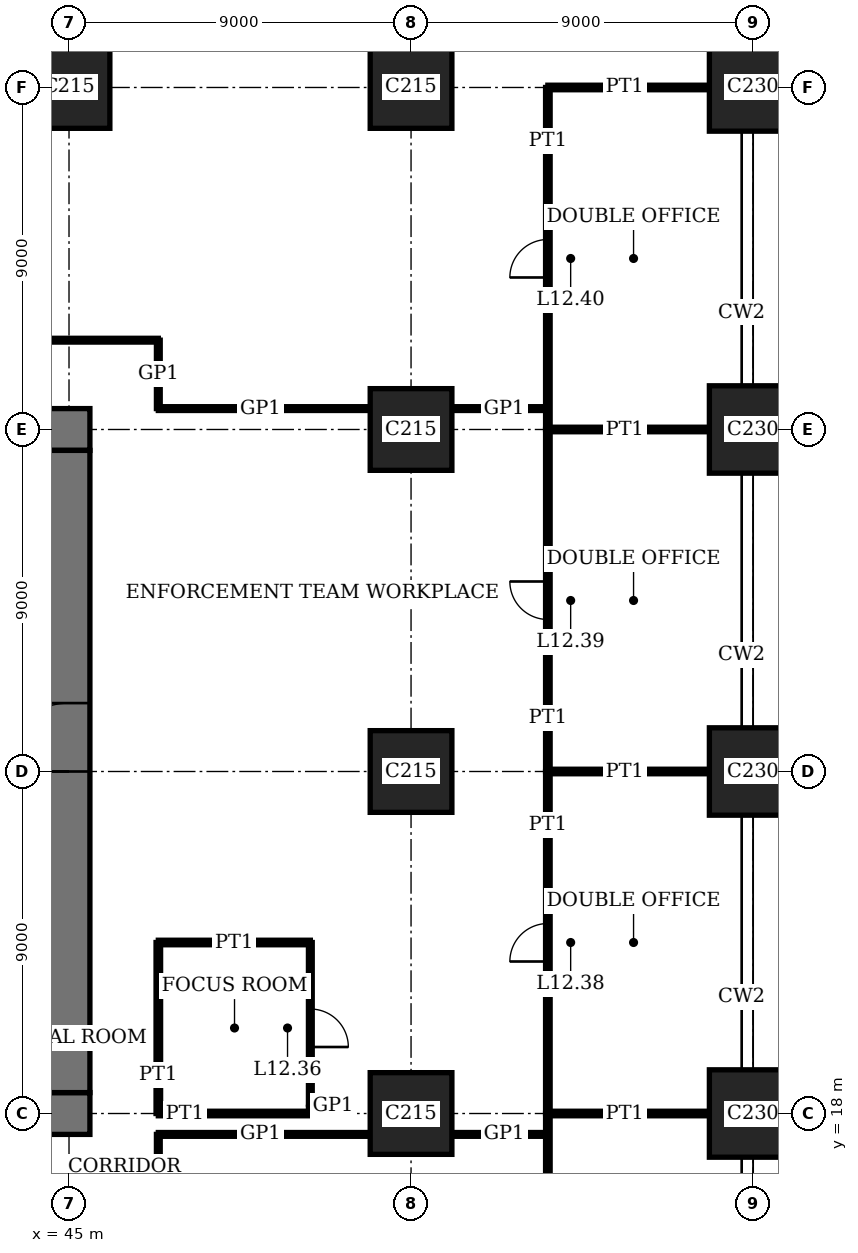
"""IFC4 building model, lengths in metres.
Left out: names, types, materials, properties, quantities, classifications, styles, units other than length and angle.
Written with IfcOpenShell. Run it as: python <this file> out.ifc"""

import sys

from ifc_helpers import new_model, si_unit, direction, frame, frame_2d, origin, origin_2d, place, context, subcontext, project, spatial, rectangle, extrude, element, fill, save


model = new_model("IFC4")
c1 = context("Model", 3, precision=1e-05, world=origin(), true_north=direction((0.0, 1.0)))
c2 = subcontext(c1, "Body", "Model", "MODEL_VIEW")
j1 = project(units=[si_unit("LENGTHUNIT", "METRE"), si_unit("PLANEANGLEUNIT", "RADIAN")], contexts=[c1])
p1 = place(None, origin())
s1 = spatial("IfcSite", under=j1, at=p1, CompositionType="ELEMENT")
p2 = place(p1, origin())
s2 = spatial("IfcBuilding", under=s1, at=p2, CompositionType="ELEMENT")
p3 = place(p2, frame((0.0, 0.0, 51.8)))
s3 = spatial("IfcBuildingStorey", under=s2, at=p3, CompositionType="ELEMENT", Elevation=51.8)
for number, where, z_axis, x_axis in (
    (1, (45.0, 45.0, 0.0), (0.0, 0.0, 1.0), (1.0, 0.0, 0.0)),
    (2, (54.0, 18.0, 0.0), (0.0, 0.0, 1.0), (1.0, 0.0, 0.0)),
    (3, (54.0, 27.0, 0.0), (0.0, 0.0, 1.0), (1.0, 0.0, 0.0)),
    (4, (54.0, 36.0, 0.0), (0.0, 0.0, 1.0), (1.0, 0.0, 0.0)),
    (5, (54.0, 45.0, 0.0), (0.0, 0.0, 1.0), (1.0, 0.0, 0.0)),
):
    element("IfcColumn", number, at=place(p3, frame(where, z_axis=z_axis, x_axis=x_axis)), inside=s3, PredefinedType="COLUMN", context=c2, shape_type="SweptSolid", body=[
        extrude(rectangle(XDim=2.15, YDim=2.15, at=origin_2d()), origin(), (0.0, 0.0, 1.0), 4.0),
    ])
for number, where, z_axis, x_axis in (
    (6, (63.0, 18.0, 0.0), (0.0, 0.0, 1.0), (1.0, 0.0, 0.0)),
    (7, (63.0, 27.0, 0.0), (0.0, 0.0, 1.0), (1.0, 0.0, 0.0)),
    (8, (63.0, 36.0, 0.0), (0.0, 0.0, 1.0), (1.0, 0.0, 0.0)),
    (9, (63.0, 45.0, 0.0), (0.0, 0.0, 1.0), (1.0, 0.0, 0.0)),
):
    element("IfcColumn", number, at=place(p3, frame(where, z_axis=z_axis, x_axis=x_axis)), inside=s3, PredefinedType="COLUMN", context=c2, shape_type="SweptSolid", body=[
        extrude(rectangle(XDim=2.3, YDim=2.3, at=origin_2d()), origin(), (0.0, 0.0, 1.0), 4.0),
    ])
p4 = place(p3, frame((17.45, 18.0, 0.0), z_axis=(0.0, 0.0, 1.0), x_axis=(1.0, 0.0, 0.0)))
e10 = element("IfcWall", 10, at=p4, inside=s3, PredefinedType="SHEAR", context=c2, shape_type="SweptSolid", body=[
    extrude(rectangle(XDim=28.1, YDim=1.1, at=frame_2d((14.05, 0.0))), origin(), (0.0, 0.0, 1.0), 4.0),
])
p5 = place(p4, frame((11.55, 0.0, 0.0)))
e11 = element("IfcOpeningElement", 11, at=p5, cuts=e10, PredefinedType="OPENING", context=c2, shape_type="SweptSolid", body=[
    extrude(rectangle(XDim=1.0, YDim=2.4, at=frame_2d((0.5, 1.2))), frame((0.0, 0.56, 0.0), z_axis=(0.0, -1.0, 0.0), x_axis=(1.0, 0.0, 0.0)), (0.0, 0.0, 1.0), 1.12),
])
p6 = place(p4, frame((16.55, 0.0, 0.0)))
e12 = element("IfcOpeningElement", 12, at=p6, cuts=e10, PredefinedType="OPENING", context=c2, shape_type="SweptSolid", body=[
    extrude(rectangle(XDim=1.0, YDim=2.4, at=frame_2d((0.5, 1.2))), frame((0.0, 0.56, 0.0), z_axis=(0.0, -1.0, 0.0), x_axis=(1.0, 0.0, 0.0)), (0.0, 0.0, 1.0), 1.12),
])
p7 = place(p4, frame((20.0, 0.0, 0.0)))
e13 = element("IfcOpeningElement", 13, at=p7, cuts=e10, PredefinedType="OPENING", context=c2, shape_type="SweptSolid", body=[
    extrude(rectangle(XDim=1.1, YDim=2.4, at=frame_2d((0.55, 1.2))), frame((0.0, 0.56, 0.0), z_axis=(0.0, -1.0, 0.0), x_axis=(1.0, 0.0, 0.0)), (0.0, 0.0, 1.0), 1.12),
])
p8 = place(p4, frame((24.05, 0.0, 0.0)))
e14 = element("IfcOpeningElement", 14, at=p8, cuts=e10, PredefinedType="OPENING", context=c2, shape_type="SweptSolid", body=[
    extrude(rectangle(XDim=1.0, YDim=2.4, at=frame_2d((0.5, 1.2))), frame((0.0, 0.56, 0.0), z_axis=(0.0, -1.0, 0.0), x_axis=(1.0, 0.0, 0.0)), (0.0, 0.0, 1.0), 1.12),
])
p9 = place(p3, frame((45.55, 36.0, 0.0), z_axis=(0.0, 0.0, 1.0), x_axis=(-1.0, 0.0, 0.0)))
e15 = element("IfcWall", 15, at=p9, inside=s3, PredefinedType="SHEAR", context=c2, shape_type="SweptSolid", body=[
    extrude(rectangle(XDim=28.1, YDim=1.1, at=frame_2d((14.05, 0.0))), origin(), (0.0, 0.0, 1.0), 4.0),
])
p10 = place(p9, frame((11.55, 0.0, 0.0)))
e16 = element("IfcOpeningElement", 16, at=p10, cuts=e15, PredefinedType="OPENING", context=c2, shape_type="SweptSolid", body=[
    extrude(rectangle(XDim=1.0, YDim=2.4, at=frame_2d((0.5, 1.2))), frame((0.0, 0.56, 0.0), z_axis=(0.0, -1.0, 0.0), x_axis=(1.0, 0.0, 0.0)), (0.0, 0.0, 1.0), 1.12),
])
p11 = place(p9, frame((16.55, 0.0, 0.0)))
e17 = element("IfcOpeningElement", 17, at=p11, cuts=e15, PredefinedType="OPENING", context=c2, shape_type="SweptSolid", body=[
    extrude(rectangle(XDim=1.0, YDim=2.4, at=frame_2d((0.5, 1.2))), frame((0.0, 0.56, 0.0), z_axis=(0.0, -1.0, 0.0), x_axis=(1.0, 0.0, 0.0)), (0.0, 0.0, 1.0), 1.12),
])
p12 = place(p9, frame((20.0, 0.0, 0.0)))
e18 = element("IfcOpeningElement", 18, at=p12, cuts=e15, PredefinedType="OPENING", context=c2, shape_type="SweptSolid", body=[
    extrude(rectangle(XDim=1.1, YDim=2.4, at=frame_2d((0.55, 1.2))), frame((0.0, 0.56, 0.0), z_axis=(0.0, -1.0, 0.0), x_axis=(1.0, 0.0, 0.0)), (0.0, 0.0, 1.0), 1.12),
])
p13 = place(p9, frame((24.05, 0.0, 0.0)))
e19 = element("IfcOpeningElement", 19, at=p13, cuts=e15, PredefinedType="OPENING", context=c2, shape_type="SweptSolid", body=[
    extrude(rectangle(XDim=1.0, YDim=2.4, at=frame_2d((0.5, 1.2))), frame((0.0, 0.56, 0.0), z_axis=(0.0, -1.0, 0.0), x_axis=(1.0, 0.0, 0.0)), (0.0, 0.0, 1.0), 1.12),
])
p14 = place(p3, frame((45.0, 18.55, 0.0), z_axis=(0.0, 0.0, 1.0), x_axis=(0.0, 1.0, 0.0)))
e20 = element("IfcWall", 20, at=p14, inside=s3, PredefinedType="SHEAR", context=c2, shape_type="SweptSolid", body=[
    extrude(rectangle(XDim=16.9, YDim=1.1, at=frame_2d((8.45, 0.0))), origin(), (0.0, 0.0, 1.0), 4.0),
])
p15 = place(p14, frame((8.45, 0.0, 0.0)))
e21 = element("IfcOpeningElement", 21, at=p15, cuts=e20, PredefinedType="OPENING", context=c2, shape_type="SweptSolid", body=[
    extrude(rectangle(XDim=1.8, YDim=2.4, at=frame_2d((0.9, 1.2))), frame((0.0, 0.56, 0.0), z_axis=(0.0, -1.0, 0.0), x_axis=(1.0, 0.0, 0.0)), (0.0, 0.0, 1.0), 1.12),
])
p16 = place(p3, frame((47.35, 17.45, 0.0), z_axis=(0.0, 0.0, 1.0), x_axis=(1.0, 0.0, 0.0)))
e22 = element("IfcWall", 22, at=p16, inside=s3, PredefinedType="PARTITIONING", context=c2, shape_type="SweptSolid", body=[
    extrude(rectangle(XDim=5.575, YDim=0.1, at=frame_2d((2.788, 0.0))), origin(), (0.0, 0.0, 1.0), 3.75),
])
p17 = place(p3, frame((55.075, 17.45, 0.0), z_axis=(0.0, 0.0, 1.0), x_axis=(1.0, 0.0, 0.0)))
e23 = element("IfcWall", 23, at=p17, inside=s3, PredefinedType="PARTITIONING", context=c2, shape_type="SweptSolid", body=[
    extrude(rectangle(XDim=2.535, YDim=0.1, at=frame_2d((1.268, 0.0))), origin(), (0.0, 0.0, 1.0), 3.75),
])
p18 = place(p3, frame((57.6, 18.0, 0.0), z_axis=(0.0, 0.0, 1.0), x_axis=(1.0, 0.0, 0.0)))
e24 = element("IfcWall", 24, at=p18, inside=s3, PredefinedType="PARTITIONING", context=c2, shape_type="SweptSolid", body=[
    extrude(rectangle(XDim=4.25, YDim=0.12, at=frame_2d((2.125, 0.0))), origin(), (0.0, 0.0, 1.0), 3.05),
])
p19 = place(p3, frame((47.35, 18.0, 0.0), z_axis=(0.0, 0.0, 1.0), x_axis=(1.0, 0.0, 0.0)))
e25 = element("IfcWall", 25, at=p19, inside=s3, PredefinedType="PARTITIONING", context=c2, shape_type="SweptSolid", body=[
    extrude(rectangle(XDim=4.0, YDim=0.12, at=frame_2d((2.0, 0.0))), origin(), (0.0, 0.0, 1.0), 3.05),
])
p20 = place(p3, frame((47.35, 22.5, 0.0), z_axis=(0.0, 0.0, 1.0), x_axis=(1.0, 0.0, 0.0)))
e26 = element("IfcWall", 26, at=p20, inside=s3, PredefinedType="PARTITIONING", context=c2, shape_type="SweptSolid", body=[
    extrude(rectangle(XDim=4.0, YDim=0.12, at=frame_2d((2.0, 0.0))), origin(), (0.0, 0.0, 1.0), 3.1),
])
for number, where, z_axis, x_axis in (
    (27, (57.6, 27.0, 0.0), (0.0, 0.0, 1.0), (1.0, 0.0, 0.0)),
    (28, (57.6, 36.0, 0.0), (0.0, 0.0, 1.0), (1.0, 0.0, 0.0)),
):
    element("IfcWall", number, at=place(p3, frame(where, z_axis=z_axis, x_axis=x_axis)), inside=s3, PredefinedType="PARTITIONING", context=c2, shape_type="SweptSolid", body=[
        extrude(rectangle(XDim=4.25, YDim=0.12, at=frame_2d((2.125, 0.0))), origin(), (0.0, 0.0, 1.0), 3.05),
    ])
p21 = place(p3, frame((47.35, 36.55, 0.0), z_axis=(0.0, 0.0, 1.0), x_axis=(1.0, 0.0, 0.0)))
e29 = element("IfcWall", 29, at=p21, inside=s3, PredefinedType="PARTITIONING", context=c2, shape_type="SweptSolid", body=[
    extrude(rectangle(XDim=5.575, YDim=0.1, at=frame_2d((2.788, 0.0))), origin(), (0.0, 0.0, 1.0), 3.75),
])
p22 = place(p3, frame((55.075, 36.55, 0.0), z_axis=(0.0, 0.0, 1.0), x_axis=(1.0, 0.0, 0.0)))
e30 = element("IfcWall", 30, at=p22, inside=s3, PredefinedType="PARTITIONING", context=c2, shape_type="SweptSolid", body=[
    extrude(rectangle(XDim=2.535, YDim=0.1, at=frame_2d((1.268, 0.0))), origin(), (0.0, 0.0, 1.0), 3.75),
])
p23 = place(p3, frame((22.5, 38.35, 0.0), z_axis=(0.0, 0.0, 1.0), x_axis=(1.0, 0.0, 0.0)))
e31 = element("IfcWall", 31, at=p23, inside=s3, PredefinedType="PARTITIONING", context=c2, shape_type="SweptSolid", body=[
    extrude(rectangle(XDim=24.85, YDim=0.1, at=frame_2d((12.425, 0.0))), origin(), (0.0, 0.0, 1.0), 3.75),
])
p24 = place(p3, frame((57.6, 45.0, 0.0), z_axis=(0.0, 0.0, 1.0), x_axis=(1.0, 0.0, 0.0)))
e32 = element("IfcWall", 32, at=p24, inside=s3, PredefinedType="PARTITIONING", context=c2, shape_type="SweptSolid", body=[
    extrude(rectangle(XDim=4.25, YDim=0.12, at=frame_2d((2.125, 0.0))), origin(), (0.0, 0.0, 1.0), 3.05),
])
p25 = place(p3, frame((47.35, 18.0, 0.0), z_axis=(0.0, 0.0, 1.0), x_axis=(0.0, 1.0, 0.0)))
e33 = element("IfcWall", 33, at=p25, inside=s3, PredefinedType="PARTITIONING", context=c2, shape_type="SweptSolid", body=[
    extrude(rectangle(XDim=4.5, YDim=0.12, at=frame_2d((2.25, 0.0))), origin(), (0.0, 0.0, 1.0), 3.75),
])
for number, where, z_axis, x_axis in (
    (34, (47.35, 15.65, 0.0), (0.0, 0.0, 1.0), (0.0, 1.0, 0.0)),
    (35, (47.35, 36.55, 0.0), (0.0, 0.0, 1.0), (0.0, 1.0, 0.0)),
):
    element("IfcWall", number, at=place(p3, frame(where, z_axis=z_axis, x_axis=x_axis)), inside=s3, PredefinedType="PARTITIONING", context=c2, shape_type="SweptSolid", body=[
        extrude(rectangle(XDim=1.8, YDim=0.1, at=frame_2d((0.9, 0.0))), origin(), (0.0, 0.0, 1.0), 3.75),
    ])
p26 = place(p3, frame((51.35, 18.0, 0.0), z_axis=(0.0, 0.0, 1.0), x_axis=(0.0, 1.0, 0.0)))
e36 = element("IfcWall", 36, at=p26, inside=s3, PredefinedType="PARTITIONING", context=c2, shape_type="SweptSolid", body=[
    extrude(rectangle(XDim=4.5, YDim=0.1, at=frame_2d((2.25, 0.0))), origin(), (0.0, 0.0, 1.0), 3.75),
])
p27 = place(p26, frame((1.75, 0.0, 0.0)))
e37 = element("IfcOpeningElement", 37, at=p27, cuts=e36, PredefinedType="OPENING", context=c2, shape_type="SweptSolid", body=[
    extrude(rectangle(XDim=1.0, YDim=2.4, at=frame_2d((0.5, 1.2))), frame((0.0, 0.06, 0.0), z_axis=(0.0, -1.0, 0.0), x_axis=(1.0, 0.0, 0.0)), (0.0, 0.0, 1.0), 0.12),
])
p28 = place(p3, frame((57.6, 9.0, 0.0), z_axis=(0.0, 0.0, 1.0), x_axis=(0.0, 1.0, 0.0)))
e38 = element("IfcWall", 38, at=p28, inside=s3, PredefinedType="PARTITIONING", context=c2, shape_type="SweptSolid", body=[
    extrude(rectangle(XDim=9.0, YDim=0.12, at=frame_2d((4.5, 0.0))), origin(), (0.0, 0.0, 1.0), 3.75),
])
p29 = place(p28, frame((4.0, 0.0, 0.0)))
e39 = element("IfcOpeningElement", 39, at=p29, cuts=e38, PredefinedType="OPENING", context=c2, shape_type="SweptSolid", body=[
    extrude(rectangle(XDim=1.0, YDim=2.4, at=frame_2d((0.5, 1.2))), frame((0.0, 0.07, 0.0), z_axis=(0.0, -1.0, 0.0), x_axis=(1.0, 0.0, 0.0)), (0.0, 0.0, 1.0), 0.14),
])
p30 = place(p3, frame((57.6, 18.0, 0.0), z_axis=(0.0, 0.0, 1.0), x_axis=(0.0, 1.0, 0.0)))
e40 = element("IfcWall", 40, at=p30, inside=s3, PredefinedType="PARTITIONING", context=c2, shape_type="SweptSolid", body=[
    extrude(rectangle(XDim=9.0, YDim=0.12, at=frame_2d((4.5, 0.0))), origin(), (0.0, 0.0, 1.0), 3.75),
])
p31 = place(p30, frame((4.0, 0.0, 0.0)))
e41 = element("IfcOpeningElement", 41, at=p31, cuts=e40, PredefinedType="OPENING", context=c2, shape_type="SweptSolid", body=[
    extrude(rectangle(XDim=1.0, YDim=2.4, at=frame_2d((0.5, 1.2))), frame((0.0, 0.07, 0.0), z_axis=(0.0, -1.0, 0.0), x_axis=(1.0, 0.0, 0.0)), (0.0, 0.0, 1.0), 0.14),
])
p32 = place(p3, frame((57.6, 27.0, 0.0), z_axis=(0.0, 0.0, 1.0), x_axis=(0.0, 1.0, 0.0)))
e42 = element("IfcWall", 42, at=p32, inside=s3, PredefinedType="PARTITIONING", context=c2, shape_type="SweptSolid", body=[
    extrude(rectangle(XDim=9.0, YDim=0.12, at=frame_2d((4.5, 0.0))), origin(), (0.0, 0.0, 1.0), 3.75),
])
p33 = place(p32, frame((4.0, 0.0, 0.0)))
e43 = element("IfcOpeningElement", 43, at=p33, cuts=e42, PredefinedType="OPENING", context=c2, shape_type="SweptSolid", body=[
    extrude(rectangle(XDim=1.0, YDim=2.4, at=frame_2d((0.5, 1.2))), frame((0.0, 0.07, 0.0), z_axis=(0.0, -1.0, 0.0), x_axis=(1.0, 0.0, 0.0)), (0.0, 0.0, 1.0), 0.14),
])
p34 = place(p3, frame((57.6, 36.0, 0.0), z_axis=(0.0, 0.0, 1.0), x_axis=(0.0, 1.0, 0.0)))
e44 = element("IfcWall", 44, at=p34, inside=s3, PredefinedType="PARTITIONING", context=c2, shape_type="SweptSolid", body=[
    extrude(rectangle(XDim=9.0, YDim=0.12, at=frame_2d((4.5, 0.0))), origin(), (0.0, 0.0, 1.0), 3.75),
])
p35 = place(p34, frame((4.0, 0.0, 0.0)))
e45 = element("IfcOpeningElement", 45, at=p35, cuts=e44, PredefinedType="OPENING", context=c2, shape_type="SweptSolid", body=[
    extrude(rectangle(XDim=1.0, YDim=2.4, at=frame_2d((0.5, 1.2))), frame((0.0, 0.07, 0.0), z_axis=(0.0, -1.0, 0.0), x_axis=(1.0, 0.0, 0.0)), (0.0, 0.0, 1.0), 0.14),
])
p36 = place(p15, origin())
e46 = element("IfcDoor", 46, at=p36, inside=s3, OperationType="DOUBLE_DOOR_DOUBLE_SWING", PredefinedType="DOOR", context=c2, shape_type="SweptSolid", body=[
    extrude(rectangle(XDim=1.8, YDim=2.4, at=frame_2d((0.9, 1.2))), frame((0.0, 0.03, 0.0), z_axis=(0.0, -1.0, 0.0), x_axis=(1.0, 0.0, 0.0)), (0.0, 0.0, 1.0), 0.06),
    extrude(rectangle(XDim=0.04, YDim=2.4, at=frame_2d((0.02, 1.2))), frame((0.0, 0.55, 0.0), z_axis=(0.0, -1.0, 0.0), x_axis=(1.0, 0.0, 0.0)), (0.0, 0.0, 1.0), 1.1),
    extrude(rectangle(XDim=0.04, YDim=2.4, at=frame_2d((1.78, 1.2))), frame((0.0, 0.55, 0.0), z_axis=(0.0, -1.0, 0.0), x_axis=(1.0, 0.0, 0.0)), (0.0, 0.0, 1.0), 1.1),
    extrude(rectangle(XDim=1.8, YDim=0.04, at=frame_2d((0.9, 2.38))), frame((0.0, 0.55, 0.0), z_axis=(0.0, -1.0, 0.0), x_axis=(1.0, 0.0, 0.0)), (0.0, 0.0, 1.0), 1.1),
])
fill(e21, e46)
p37 = place(p27, origin())
e47 = element("IfcDoor", 47, at=p37, inside=s3, OperationType="SINGLE_SWING_LEFT", PredefinedType="DOOR", context=c2, shape_type="SweptSolid", body=[
    extrude(rectangle(XDim=1.0, YDim=2.4, at=frame_2d((0.5, 1.2))), frame((0.0, 0.02, 0.0), z_axis=(0.0, -1.0, 0.0), x_axis=(1.0, 0.0, 0.0)), (0.0, 0.0, 1.0), 0.04),
])
fill(e37, e47)
p38 = place(p31, origin())
e48 = element("IfcDoor", 48, at=p38, inside=s3, OperationType="SINGLE_SWING_RIGHT", PredefinedType="DOOR", context=c2, shape_type="SweptSolid", body=[
    extrude(rectangle(XDim=1.0, YDim=2.4, at=frame_2d((0.5, 1.2))), frame((0.0, 0.025, 0.0), z_axis=(0.0, -1.0, 0.0), x_axis=(1.0, 0.0, 0.0)), (0.0, 0.0, 1.0), 0.05),
])
fill(e41, e48)
p39 = place(p33, origin())
e49 = element("IfcDoor", 49, at=p39, inside=s3, OperationType="SINGLE_SWING_LEFT", PredefinedType="DOOR", context=c2, shape_type="SweptSolid", body=[
    extrude(rectangle(XDim=1.0, YDim=2.4, at=frame_2d((0.5, 1.2))), frame((0.0, 0.025, 0.0), z_axis=(0.0, -1.0, 0.0), x_axis=(1.0, 0.0, 0.0)), (0.0, 0.0, 1.0), 0.05),
])
fill(e43, e49)
p40 = place(p35, origin())
e50 = element("IfcDoor", 50, at=p40, inside=s3, OperationType="SINGLE_SWING_RIGHT", PredefinedType="DOOR", context=c2, shape_type="SweptSolid", body=[
    extrude(rectangle(XDim=1.0, YDim=2.4, at=frame_2d((0.5, 1.2))), frame((0.0, 0.025, 0.0), z_axis=(0.0, -1.0, 0.0), x_axis=(1.0, 0.0, 0.0)), (0.0, 0.0, 1.0), 0.05),
])
fill(e45, e50)
save(model, sys.argv[1])
